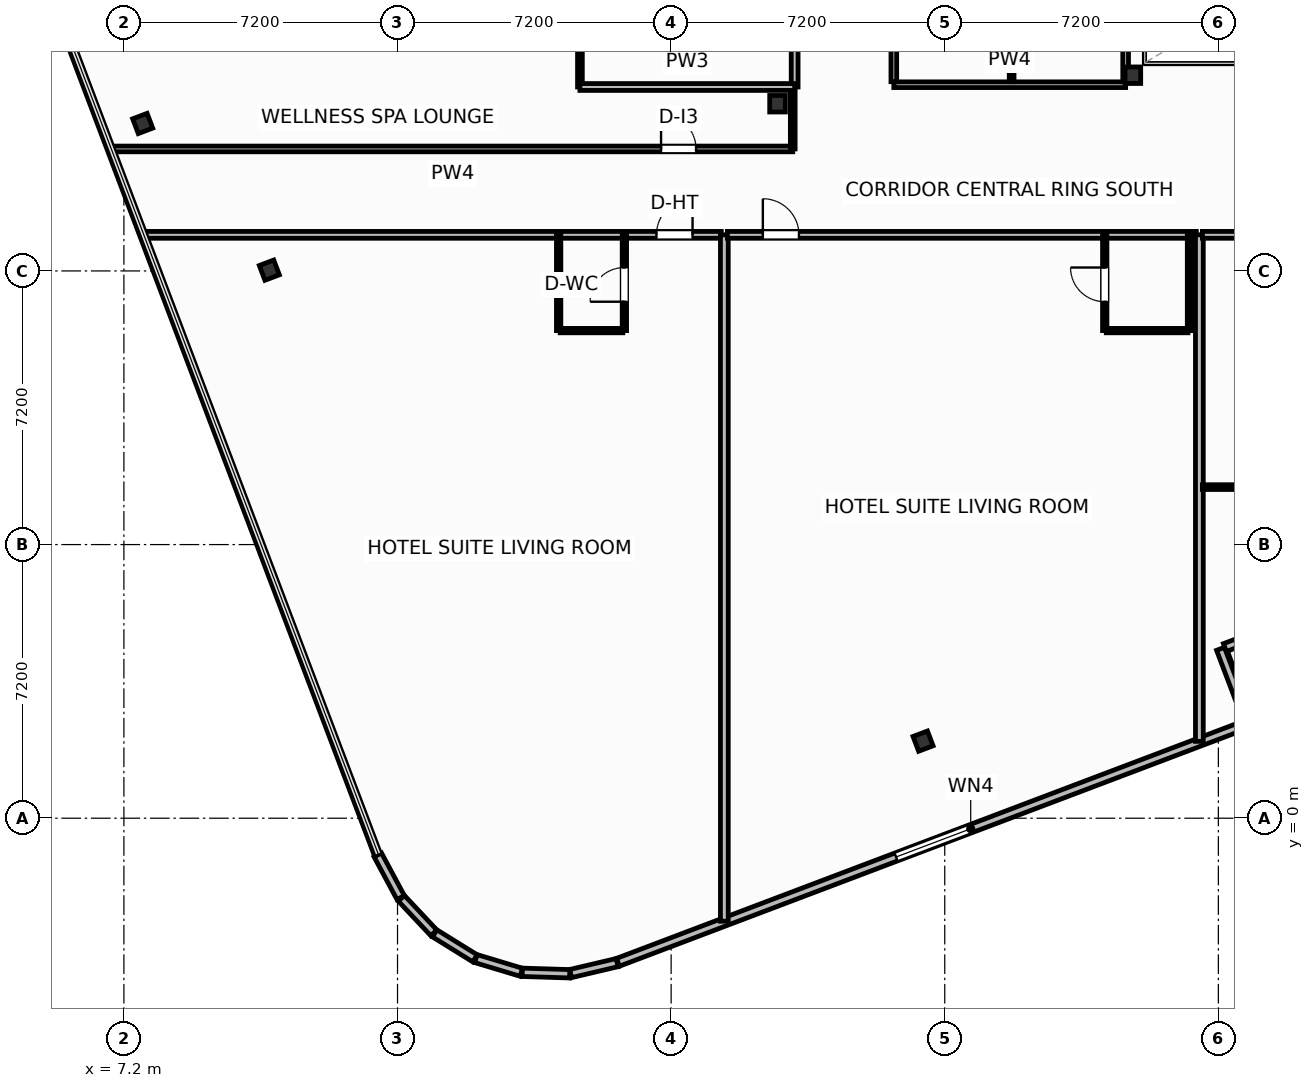
"""IFC4 building model, lengths in metres.
Left out: names, types, materials, properties, quantities, classifications, styles, units other than length and angle.
Written with IfcOpenShell. Run it as: python <this file> out.ifc"""

import sys

from ifc_helpers import new_model, si_unit, direction, frame, frame_2d, origin, origin_2d, place, context, subcontext, project, spatial, rectangle, i_section, extrude, element, fill, save


model = new_model("IFC4")
c1 = context("Model", 3, precision=1e-05, world=origin(), true_north=direction((0.0, 1.0)))
c2 = subcontext(c1, "Body", "Model", "MODEL_VIEW")
j1 = project(units=[si_unit("LENGTHUNIT", "METRE"), si_unit("PLANEANGLEUNIT", "RADIAN")], contexts=[c1])
p1 = place(None, origin())
s1 = spatial("IfcSite", under=j1, at=p1, CompositionType="ELEMENT")
p2 = place(p1, origin())
s2 = spatial("IfcBuilding", under=s1, at=p2, CompositionType="ELEMENT")
p3 = place(p2, frame((0.0, 0.0, 231.2)))
s3 = spatial("IfcBuildingStorey", under=s2, at=p3, CompositionType="ELEMENT", Elevation=231.2)
for number, where, z_axis, x_axis in (
    (1, (33.75, 19.55, 0.0), (0.0, 0.0, 1.0), (1.0, 0.0, 0.0)),
    (2, (24.4, 18.8, 0.0), (0.0, 0.0, 1.0), (1.0, 0.0, 0.0)),
):
    element("IfcColumn", number, at=place(p3, frame(where, z_axis=z_axis, x_axis=x_axis)), inside=s3, PredefinedType="COLUMN", context=c2, shape_type="SweptSolid", body=[
        extrude(i_section(OverallWidth=0.412, OverallDepth=0.435, WebThickness=0.036, FlangeThickness=0.057, FilletRadius=0.025, at=origin_2d()), origin(), (0.0, 0.0, 1.0), 3.7),
    ])
for number, where, z_axis, x_axis in (
    (3, (28.229, 2.028, 0.0), (0.0, 0.0, 1.0), (0.935, 0.354, 0.0)),
    (4, (7.695, 18.281, 0.0), (0.0, 0.0, 1.0), (0.935, 0.354, 0.0)),
    (5, (11.027, 14.42, 0.0), (0.0, 0.0, 1.0), (0.935, 0.354, 0.0)),
):
    element("IfcColumn", number, at=place(p3, frame(where, z_axis=z_axis, x_axis=x_axis)), inside=s3, PredefinedType="COLUMN", context=c2, shape_type="SweptSolid", body=[
        extrude(i_section(OverallWidth=0.406, OverallDepth=0.416, WebThickness=0.03, FlangeThickness=0.048, FilletRadius=0.025, at=origin_2d()), origin(), (0.0, 0.0, 1.0), 3.7),
    ])
p4 = place(p3, frame((41.783, 6.614, 0.0), z_axis=(0.0, 0.0, 1.0), x_axis=(-0.93521416643, -0.354082565101, 0.0)))
e6 = element("IfcWall", 6, at=p4, inside=s3, PredefinedType="SOLIDWALL", context=c2, shape_type="SweptSolid", body=[
    extrude(rectangle(XDim=6.0, YDim=0.22, at=frame_2d((3.0, 0.0))), origin(), (0.0, 0.0, 1.0), 2.73),
])
p5 = place(p4, frame((1.888, 0.0, 0.0)))
e7 = element("IfcOpeningElement", 7, at=p5, cuts=e6, PredefinedType="OPENING", context=c2, shape_type="SweptSolid", body=[
    extrude(rectangle(XDim=2.1, YDim=2.3, at=frame_2d((1.05, 1.15))), frame((0.0, 0.12, 0.0), z_axis=(0.0, -1.0, 0.0), x_axis=(1.0, 0.0, 0.0)), (0.0, 0.0, 1.0), 0.24),
])
p6 = place(p3, frame((13.881, -0.966, 0.0), z_axis=(0.0, 0.0, 1.0), x_axis=(0.473242342135, -0.88093228208, 0.0)))
e8 = element("IfcWall", 8, at=p6, inside=s3, PredefinedType="SOLIDWALL", context=c2, shape_type="SweptSolid", body=[
    extrude(rectangle(XDim=1.274, YDim=0.22, at=frame_2d((0.637, 0.0))), origin(), (0.0, 0.0, 1.0), 2.73),
])
for number, where, z_axis, x_axis in (
    (9, (14.5, -2.106, 0.0), (0.0, 0.0, 1.0), (0.685, -0.729, 0.0)),
    (10, (15.377, -3.029, 0.0), (0.0, 0.0, 1.0), (0.85, -0.526, 0.0)),
    (11, (16.463, -3.694, 0.0), (0.0, 0.0, 1.0), (0.958, -0.288, 0.0)),
):
    element("IfcWall", number, at=place(p3, frame(where, z_axis=z_axis, x_axis=x_axis)), inside=s3, PredefinedType="SOLIDWALL", context=c2, shape_type="SweptSolid", body=[
        extrude(rectangle(XDim=1.249, YDim=0.22, at=frame_2d((0.624, 0.0))), origin(), (0.0, 0.0, 1.0), 2.73),
    ])
p7 = place(p3, frame((17.683, -4.055, 0.0), z_axis=(0.0, 0.0, 1.0), x_axis=(0.999522886512, -0.030886879732, 0.0)))
e12 = element("IfcWall", 12, at=p7, inside=s3, PredefinedType="SOLIDWALL", context=c2, shape_type="SweptSolid", body=[
    extrude(rectangle(XDim=1.249, YDim=0.22, at=frame_2d((0.625, 0.0))), origin(), (0.0, 0.0, 1.0), 2.73),
])
p8 = place(p3, frame((18.956, -4.087, 0.0), z_axis=(0.0, 0.0, 1.0), x_axis=(0.973463008152, 0.228844426981, 0.0)))
e13 = element("IfcWall", 13, at=p8, inside=s3, PredefinedType="SOLIDWALL", context=c2, shape_type="SweptSolid", body=[
    extrude(rectangle(XDim=1.257, YDim=0.22, at=frame_2d((0.628, 0.0))), origin(), (0.0, 0.0, 1.0), 2.73),
])
p9 = place(p3, frame((20.202, -3.791, 0.0), z_axis=(0.0, 0.0, 1.0), x_axis=(0.935225574232, 0.354052432984, 0.0)))
e14 = element("IfcWall", 14, at=p9, inside=s3, PredefinedType="SOLIDWALL", context=c2, shape_type="SweptSolid", body=[
    extrude(rectangle(XDim=17.747, YDim=0.22, at=frame_2d((8.874, 0.0))), origin(), (0.0, 0.0, 1.0), 2.73),
])
p10 = place(p9, frame((7.823, 0.0, 0.8)))
e15 = element("IfcOpeningElement", 15, at=p10, cuts=e14, PredefinedType="OPENING", context=c2, shape_type="SweptSolid", body=[
    extrude(rectangle(XDim=2.1, YDim=1.75, at=frame_2d((1.05, 0.875))), frame((0.0, 0.12, 0.0), z_axis=(0.0, -1.0, 0.0), x_axis=(1.0, 0.0, 0.0)), (0.0, 0.0, 1.0), 0.24),
])
p11 = place(p3, frame((36.755, 2.61, 0.0), z_axis=(0.0, 0.0, 1.0), x_axis=(-0.354020680661, 0.935237594232, 0.0)))
e16 = element("IfcWall", 16, at=p11, inside=s3, PredefinedType="SOLIDWALL", context=c2, shape_type="SweptSolid", body=[
    extrude(rectangle(XDim=1.975, YDim=0.22, at=frame_2d((0.988, 0.0))), origin(), (0.0, 0.0, 1.0), 2.73),
])
p12 = place(p3, frame((6.908, 17.61, 0.0), z_axis=(0.0, 0.0, 1.0), x_axis=(1.0, 0.0, 0.0)))
e17 = element("IfcWall", 17, at=p12, inside=s3, PredefinedType="PARTITIONING", context=c2, shape_type="SweptSolid", body=[
    extrude(rectangle(XDim=17.892, YDim=0.15, at=frame_2d((8.946, 0.0))), origin(), (0.0, 0.0, 1.0), 3.45),
])
p13 = place(p12, frame((14.427, 0.0, 0.0)))
e18 = element("IfcOpeningElement", 18, at=p13, cuts=e17, PredefinedType="OPENING", context=c2, shape_type="SweptSolid", body=[
    extrude(rectangle(XDim=0.92, YDim=2.05, at=frame_2d((0.46, 1.025))), frame((0.0, 0.085, 0.0), z_axis=(0.0, -1.0, 0.0), x_axis=(1.0, 0.0, 0.0)), (0.0, 0.0, 1.0), 0.17),
])
p14 = place(p3, frame((24.8, 17.61, 0.0), z_axis=(0.0, 0.0, 1.0), x_axis=(0.0, 1.0, 0.0)))
e19 = element("IfcWall", 19, at=p14, inside=s3, PredefinedType="PARTITIONING", context=c2, shape_type="SweptSolid", body=[
    extrude(rectangle(XDim=1.63, YDim=0.125, at=frame_2d((0.815, 0.0))), origin(), (0.0, 0.0, 1.0), 2.739),
])
p15 = place(p3, frame((7.764, 15.35, 0.0), z_axis=(0.0, 0.0, 1.0), x_axis=(1.0, 0.0, 0.0)))
e20 = element("IfcWall", 20, at=p15, inside=s3, PredefinedType="PARTITIONING", context=c2, shape_type="SweptSolid", body=[
    extrude(rectangle(XDim=15.156, YDim=0.18, at=frame_2d((7.578, 0.0))), origin(), (0.0, 0.0, 1.0), 3.45),
])
p16 = place(p15, frame((13.45, 0.0, 0.0)))
e21 = element("IfcOpeningElement", 21, at=p16, cuts=e20, PredefinedType="OPENING", context=c2, shape_type="SweptSolid", body=[
    extrude(rectangle(XDim=0.95, YDim=2.15, at=frame_2d((0.475, 1.075))), frame((0.0, 0.1, 0.0), z_axis=(0.0, -1.0, 0.0), x_axis=(1.0, 0.0, 0.0)), (0.0, 0.0, 1.0), 0.2),
])
p17 = place(p3, frame((18.68, 12.83, 0.0), z_axis=(0.0, 0.0, 1.0), x_axis=(1.0, 0.0, 0.0)))
e22 = element("IfcWall", 22, at=p17, inside=s3, PredefinedType="PARTITIONING", context=c2, shape_type="SweptSolid", body=[
    extrude(rectangle(XDim=1.65, YDim=0.115, at=frame_2d((0.825, 0.0))), origin(), (0.0, 0.0, 1.0), 3.45),
])
p18 = place(p3, frame((20.37, 12.83, 0.0), z_axis=(0.0, 0.0, 1.0), x_axis=(0.0, 1.0, 0.0)))
e23 = element("IfcWall", 23, at=p18, inside=s3, PredefinedType="PARTITIONING", context=c2, shape_type="SweptSolid", body=[
    extrude(rectangle(XDim=2.52, YDim=0.115, at=frame_2d((1.26, 0.0))), origin(), (0.0, 0.0, 1.0), 3.45),
])
p19 = place(p18, frame((0.76, 0.0, 0.0)))
e24 = element("IfcOpeningElement", 24, at=p19, cuts=e23, PredefinedType="OPENING", context=c2, shape_type="SweptSolid", body=[
    extrude(rectangle(XDim=0.9, YDim=2.05, at=frame_2d((0.45, 1.025))), frame((0.0, 0.067, 0.0), z_axis=(0.0, -1.0, 0.0), x_axis=(1.0, 0.0, 0.0)), (0.0, 0.0, 1.0), 0.135),
])
p20 = place(p3, frame((18.64, 12.83, 0.0), z_axis=(0.0, 0.0, 1.0), x_axis=(0.0, 1.0, 0.0)))
e25 = element("IfcWall", 25, at=p20, inside=s3, PredefinedType="PARTITIONING", context=c2, shape_type="SweptSolid", body=[
    extrude(rectangle(XDim=2.52, YDim=0.115, at=frame_2d((1.26, 0.0))), origin(), (0.0, 0.0, 1.0), 3.45),
])
p21 = place(p3, frame((23.0, -2.71, 0.0), z_axis=(0.0, 0.0, 1.0), x_axis=(0.0, 1.0, 0.0)))
e26 = element("IfcWall", 26, at=p21, inside=s3, PredefinedType="PARTITIONING", context=c2, shape_type="SweptSolid", body=[
    extrude(rectangle(XDim=18.06, YDim=0.205, at=frame_2d((9.03, 0.0))), origin(), (0.0, 0.0, 1.0), 3.45),
])
p22 = place(p3, frame((23.08, 15.35, 0.0), z_axis=(0.0, 0.0, 1.0), x_axis=(1.0, 0.0, 0.0)))
e27 = element("IfcWall", 27, at=p22, inside=s3, PredefinedType="PARTITIONING", context=c2, shape_type="SweptSolid", body=[
    extrude(rectangle(XDim=12.34, YDim=0.18, at=frame_2d((6.17, 0.0))), origin(), (0.0, 0.0, 1.0), 3.45),
])
p23 = place(p22, frame((0.933, 0.0, 0.0)))
e28 = element("IfcOpeningElement", 28, at=p23, cuts=e27, PredefinedType="OPENING", context=c2, shape_type="SweptSolid", body=[
    extrude(rectangle(XDim=0.95, YDim=2.15, at=frame_2d((0.475, 1.075))), frame((0.0, 0.1, 0.0), z_axis=(0.0, -1.0, 0.0), x_axis=(1.0, 0.0, 0.0)), (0.0, 0.0, 1.0), 0.2),
])
p24 = place(p3, frame((33.05, 12.83, 0.0), z_axis=(0.0, 0.0, 1.0), x_axis=(1.0, 0.0, 0.0)))
e29 = element("IfcWall", 29, at=p24, inside=s3, PredefinedType="PARTITIONING", context=c2, shape_type="SweptSolid", body=[
    extrude(rectangle(XDim=2.15, YDim=0.115, at=frame_2d((1.075, 0.0))), origin(), (0.0, 0.0, 1.0), 3.45),
])
p25 = place(p3, frame((33.01, 12.83, 0.0), z_axis=(0.0, 0.0, 1.0), x_axis=(0.0, 1.0, 0.0)))
e30 = element("IfcWall", 30, at=p25, inside=s3, PredefinedType="PARTITIONING", context=c2, shape_type="SweptSolid", body=[
    extrude(rectangle(XDim=2.52, YDim=0.115, at=frame_2d((1.26, 0.0))), origin(), (0.0, 0.0, 1.0), 3.45),
])
p26 = place(p25, frame((0.76, 0.0, 0.0)))
e31 = element("IfcOpeningElement", 31, at=p26, cuts=e30, PredefinedType="OPENING", context=c2, shape_type="SweptSolid", body=[
    extrude(rectangle(XDim=0.9, YDim=2.05, at=frame_2d((0.45, 1.025))), frame((0.0, 0.067, 0.0), z_axis=(0.0, -1.0, 0.0), x_axis=(1.0, 0.0, 0.0)), (0.0, 0.0, 1.0), 0.135),
])
p27 = place(p3, frame((35.24, 12.83, 0.0), z_axis=(0.0, 0.0, 1.0), x_axis=(0.0, 1.0, 0.0)))
e32 = element("IfcWall", 32, at=p27, inside=s3, PredefinedType="PARTITIONING", context=c2, shape_type="SweptSolid", body=[
    extrude(rectangle(XDim=2.52, YDim=0.115, at=frame_2d((1.26, 0.0))), origin(), (0.0, 0.0, 1.0), 2.739),
])
p28 = place(p3, frame((35.5, 2.022, 0.0), z_axis=(0.0, 0.0, 1.0), x_axis=(0.0, 1.0, 0.0)))
e33 = element("IfcWall", 33, at=p28, inside=s3, PredefinedType="PARTITIONING", context=c2, shape_type="SweptSolid", body=[
    extrude(rectangle(XDim=13.328, YDim=0.205, at=frame_2d((6.664, 0.0))), origin(), (0.0, 0.0, 1.0), 2.739),
])
p29 = place(p3, frame((35.58, 8.712, 0.0), z_axis=(0.0, 0.0, 1.0), x_axis=(1.0, 0.0, 0.0)))
e34 = element("IfcWall", 34, at=p29, inside=s3, PredefinedType="PARTITIONING", context=c2, shape_type="SweptSolid", body=[
    extrude(rectangle(XDim=7.47, YDim=0.125, at=frame_2d((3.735, 0.0))), origin(), (0.0, 0.0, 1.0), 3.45),
])
p30 = place(p29, frame((3.362, 0.0, 0.0)))
e35 = element("IfcOpeningElement", 35, at=p30, cuts=e34, PredefinedType="OPENING", context=c2, shape_type="SweptSolid", body=[
    extrude(rectangle(XDim=0.92, YDim=2.05, at=frame_2d((0.46, 1.025))), frame((0.0, 0.073, 0.0), z_axis=(0.0, -1.0, 0.0), x_axis=(1.0, 0.0, 0.0)), (0.0, 0.0, 1.0), 0.145),
])
p31 = place(p3, frame((35.58, 15.35, 0.0), z_axis=(0.0, 0.0, 1.0), x_axis=(1.0, 0.0, 0.0)))
e36 = element("IfcWall", 36, at=p31, inside=s3, PredefinedType="PARTITIONING", context=c2, shape_type="SweptSolid", body=[
    extrude(rectangle(XDim=12.34, YDim=0.18, at=frame_2d((6.17, 0.0))), origin(), (0.0, 0.0, 1.0), 3.45),
])
p32 = place(p31, frame((3.235, 0.0, 0.0)))
e37 = element("IfcOpeningElement", 37, at=p32, cuts=e36, PredefinedType="OPENING", context=c2, shape_type="SweptSolid", body=[
    extrude(rectangle(XDim=1.0, YDim=2.2, at=frame_2d((0.5, 1.1))), frame((0.0, 0.1, 0.0), z_axis=(0.0, -1.0, 0.0), x_axis=(1.0, 0.0, 0.0)), (0.0, 0.0, 1.0), 0.2),
])
p33 = place(p3, frame((24.85, 19.24, 0.0), z_axis=(0.0, 0.0, 1.0), x_axis=(0.0, 1.0, 0.0)))
e38 = element("IfcWall", 38, at=p33, inside=s3, PredefinedType="PARTITIONING", context=c2, shape_type="SweptSolid", body=[
    extrude(rectangle(XDim=7.42, YDim=0.18, at=frame_2d((3.71, 0.0))), origin(), (0.0, 0.0, 1.0), 3.45),
])
p34 = place(p33, frame((2.4, 0.0, 0.0)))
e39 = element("IfcOpeningElement", 39, at=p34, cuts=e38, PredefinedType="OPENING", context=c2, shape_type="SweptSolid", body=[
    extrude(rectangle(XDim=0.92, YDim=2.05, at=frame_2d((0.46, 1.025))), frame((0.0, 0.1, 0.0), z_axis=(0.0, -1.0, 0.0), x_axis=(1.0, 0.0, 0.0)), (0.0, 0.0, 1.0), 0.2),
])
p35 = place(p3, frame((19.2, 19.24, 0.0), z_axis=(0.0, 0.0, 1.0), x_axis=(0.0, 1.0, 0.0)))
e40 = element("IfcWall", 40, at=p35, inside=s3, PredefinedType="PARTITIONING", context=c2, shape_type="SweptSolid", body=[
    extrude(rectangle(XDim=7.42, YDim=0.125, at=frame_2d((3.71, 0.0))), origin(), (0.0, 0.0, 1.0), 3.45),
])
p36 = place(p3, frame((19.2, 19.24, 0.0), z_axis=(0.0, 0.0, 1.0), x_axis=(1.0, 0.0, 0.0)))
e41 = element("IfcWall", 41, at=p36, inside=s3, PredefinedType="PARTITIONING", context=c2, shape_type="SweptSolid", body=[
    extrude(rectangle(XDim=5.65, YDim=0.18, at=frame_2d((2.825, 0.0))), origin(), (0.0, 0.0, 1.0), 3.45),
])
p37 = place(p3, frame((27.46, 19.3, 0.0), z_axis=(0.0, 0.0, 1.0), x_axis=(1.0, 0.0, 0.0)))
e42 = element("IfcWall", 42, at=p37, inside=s3, PredefinedType="PARTITIONING", context=c2, shape_type="SweptSolid", body=[
    extrude(rectangle(XDim=6.1, YDim=0.15, at=frame_2d((3.05, 0.0))), origin(), (0.0, 0.0, 1.0), 2.662),
])
p38 = place(p3, frame((30.56, 19.38, 0.0), z_axis=(0.0, 0.0, 1.0), x_axis=(0.0, 1.0, 0.0)))
e43 = element("IfcWall", 43, at=p38, inside=s3, PredefinedType="PARTITIONING", context=c2, shape_type="SweptSolid", body=[
    extrude(rectangle(XDim=7.16, YDim=0.125, at=frame_2d((3.58, 0.0))), origin(), (0.0, 0.0, 1.0), 3.45),
])
p39 = place(p38, frame((1.4, 0.0, 0.0)))
e44 = element("IfcOpeningElement", 44, at=p39, cuts=e43, PredefinedType="OPENING", context=c2, shape_type="SweptSolid", body=[
    extrude(rectangle(XDim=0.92, YDim=2.05, at=frame_2d((0.46, 1.025))), frame((0.0, 0.073, 0.0), z_axis=(0.0, -1.0, 0.0), x_axis=(1.0, 0.0, 0.0)), (0.0, 0.0, 1.0), 0.145),
])
p40 = place(p3, frame((27.46, 19.38, 0.0), z_axis=(0.0, 0.0, 1.0), x_axis=(0.0, 1.0, 0.0)))
e45 = element("IfcWall", 45, at=p40, inside=s3, PredefinedType="PARTITIONING", context=c2, shape_type="SweptSolid", body=[
    extrude(rectangle(XDim=7.16, YDim=0.15, at=frame_2d((3.58, 0.0))), origin(), (0.0, 0.0, 1.0), 3.45),
])
p41 = place(p3, frame((33.56, 19.38, 0.0), z_axis=(0.0, 0.0, 1.0), x_axis=(0.0, 1.0, 0.0)))
e46 = element("IfcWall", 46, at=p41, inside=s3, PredefinedType="PARTITIONING", context=c2, shape_type="SweptSolid", body=[
    extrude(rectangle(XDim=7.16, YDim=0.15, at=frame_2d((3.58, 0.0))), origin(), (0.0, 0.0, 1.0), 2.824),
])
p42 = place(p10, origin())
e47 = element("IfcWindow", 47, at=p42, inside=s3, PartitioningType="SINGLE_PANEL", PredefinedType="WINDOW", context=c2, shape_type="SweptSolid", body=[
    extrude(rectangle(XDim=2.1, YDim=1.75, at=frame_2d((1.05, 0.875))), frame((0.0, 0.03, 0.0), z_axis=(0.0, -1.0, 0.0), x_axis=(1.0, 0.0, 0.0)), (0.0, 0.0, 1.0), 0.06),
])
fill(e15, e47)
p43 = place(p13, origin())
e48 = element("IfcDoor", 48, at=p43, inside=s3, OperationType="SINGLE_SWING_LEFT", PredefinedType="DOOR", context=c2, shape_type="SweptSolid", body=[
    extrude(rectangle(XDim=0.92, YDim=2.05, at=frame_2d((0.46, 1.025))), frame((0.0, 0.025, 0.0), z_axis=(0.0, -1.0, 0.0), x_axis=(1.0, 0.0, 0.0)), (0.0, 0.0, 1.0), 0.05),
])
fill(e18, e48)
p44 = place(p16, origin())
e49 = element("IfcDoor", 49, at=p44, inside=s3, OperationType="SINGLE_SWING_RIGHT", PredefinedType="DOOR", context=c2, shape_type="SweptSolid", body=[
    extrude(rectangle(XDim=0.95, YDim=2.15, at=frame_2d((0.475, 1.075))), frame((0.0, 0.025, 0.0), z_axis=(0.0, -1.0, 0.0), x_axis=(1.0, 0.0, 0.0)), (0.0, 0.0, 1.0), 0.05),
])
fill(e21, e49)
p45 = place(p19, origin())
e50 = element("IfcDoor", 50, at=p45, inside=s3, OperationType="SINGLE_SWING_LEFT", PredefinedType="DOOR", context=c2, shape_type="SweptSolid", body=[
    extrude(rectangle(XDim=0.9, YDim=2.05, at=frame_2d((0.45, 1.025))), frame((0.0, 0.025, 0.0), z_axis=(0.0, -1.0, 0.0), x_axis=(1.0, 0.0, 0.0)), (0.0, 0.0, 1.0), 0.05),
])
fill(e24, e50)
p46 = place(p23, origin())
e51 = element("IfcDoor", 51, at=p46, inside=s3, OperationType="SINGLE_SWING_LEFT", PredefinedType="DOOR", context=c2, shape_type="SweptSolid", body=[
    extrude(rectangle(XDim=0.95, YDim=2.15, at=frame_2d((0.475, 1.075))), frame((0.0, 0.025, 0.0), z_axis=(0.0, -1.0, 0.0), x_axis=(1.0, 0.0, 0.0)), (0.0, 0.0, 1.0), 0.05),
])
fill(e28, e51)
p47 = place(p26, origin())
e52 = element("IfcDoor", 52, at=p47, inside=s3, OperationType="SINGLE_SWING_RIGHT", PredefinedType="DOOR", context=c2, shape_type="SweptSolid", body=[
    extrude(rectangle(XDim=0.9, YDim=2.05, at=frame_2d((0.45, 1.025))), frame((0.0, 0.025, 0.0), z_axis=(0.0, -1.0, 0.0), x_axis=(1.0, 0.0, 0.0)), (0.0, 0.0, 1.0), 0.05),
])
fill(e31, e52)
save(model, sys.argv[1])
